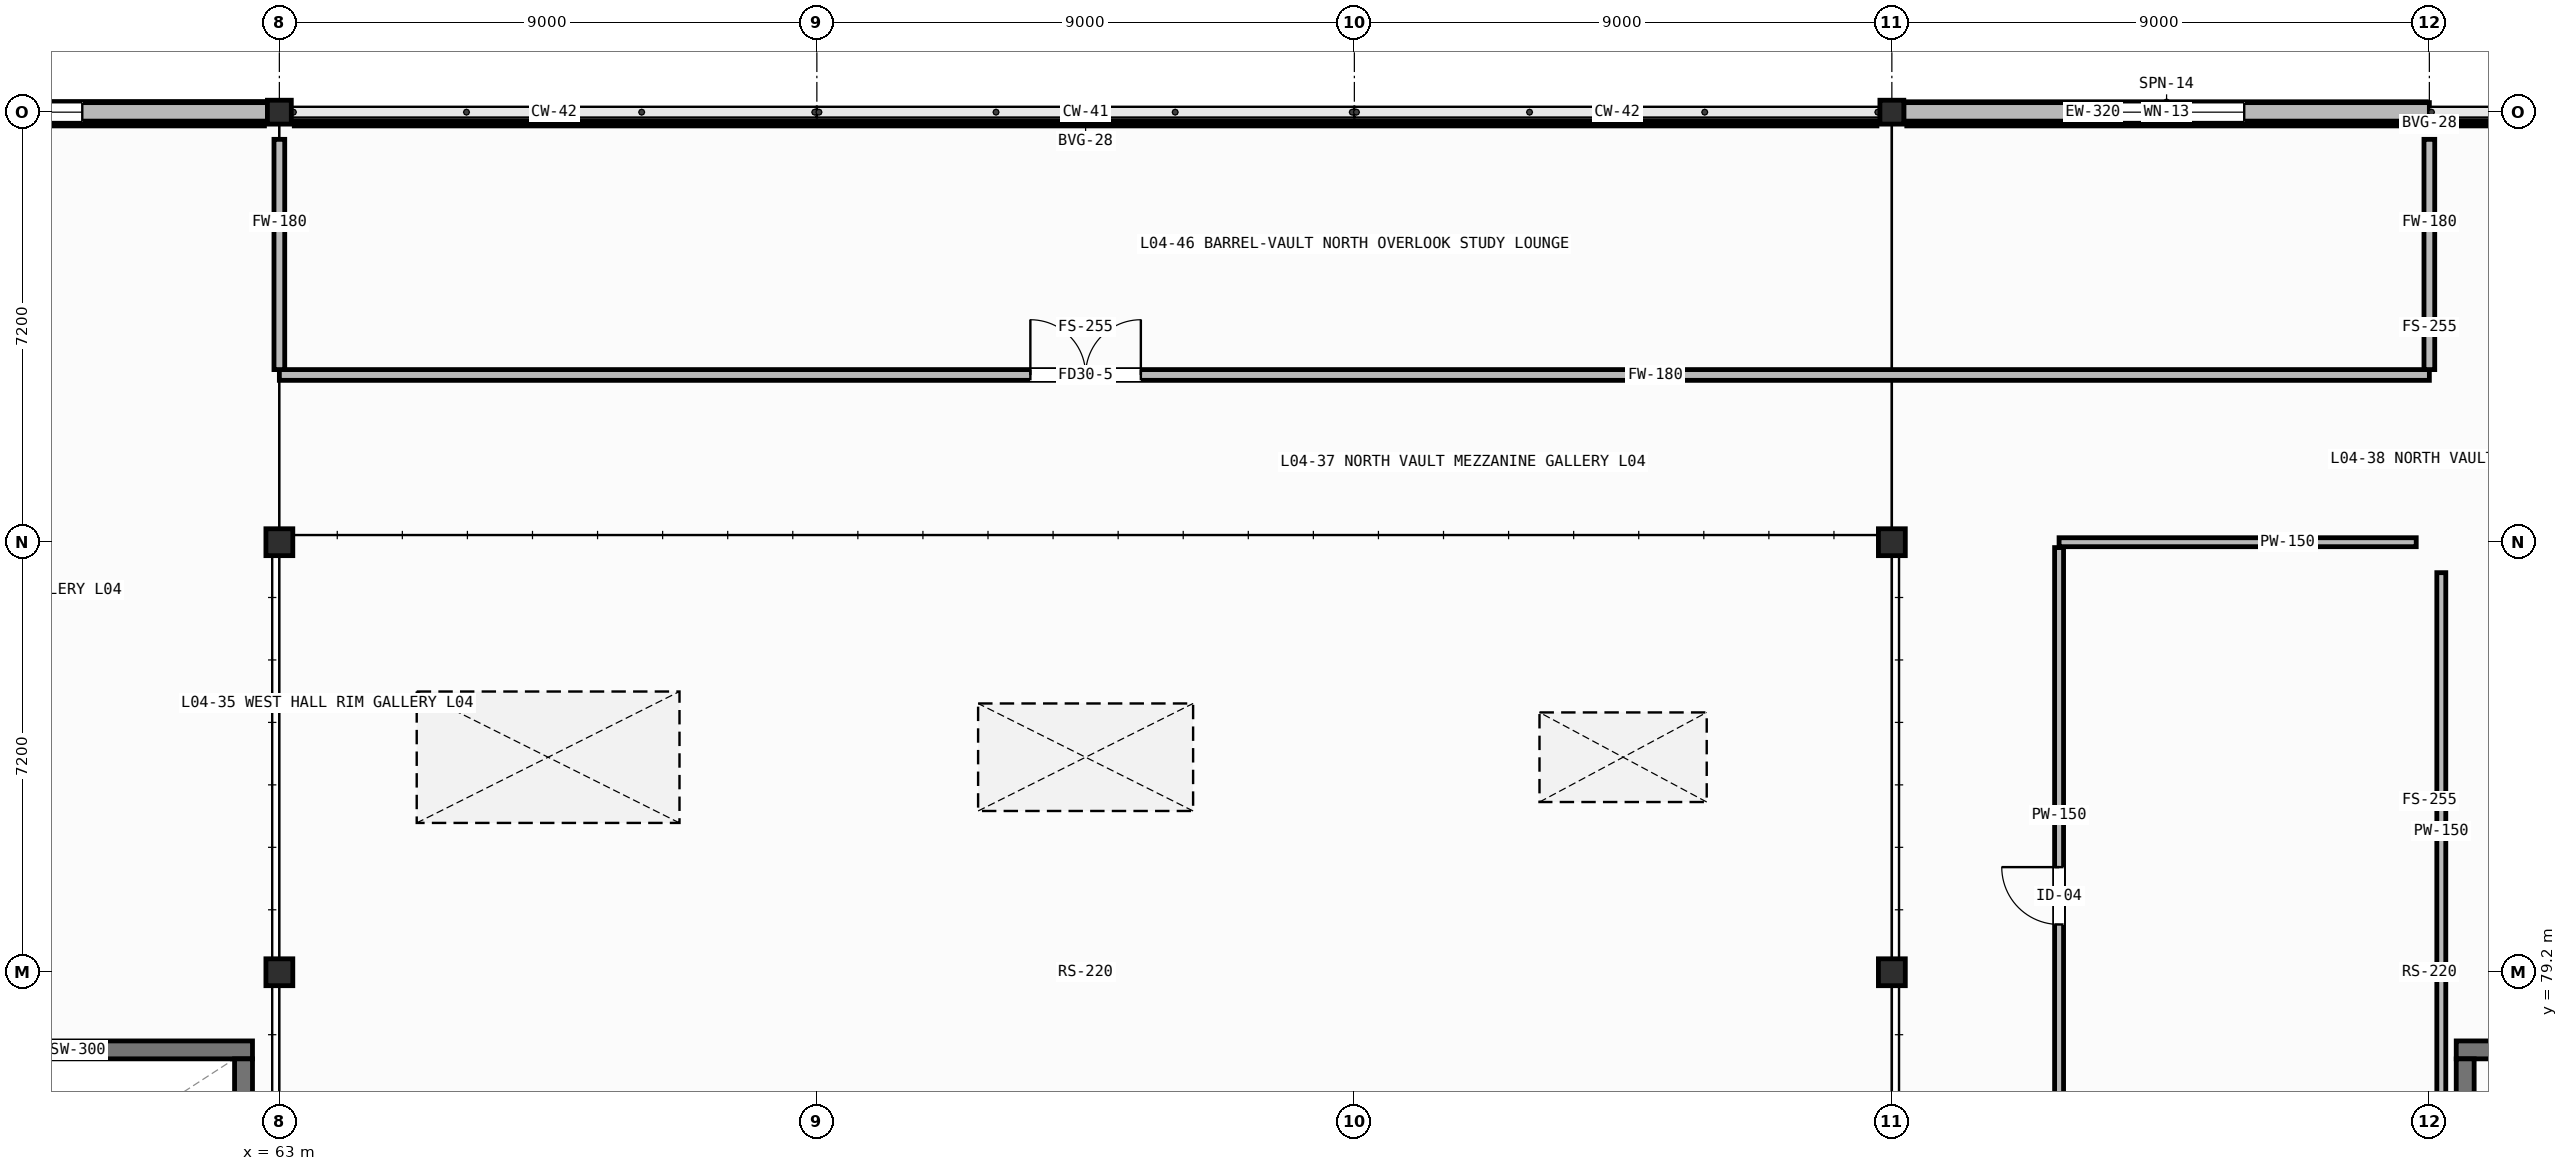
"""IFC4 building model, lengths in metres.
Left out: names, types, materials, properties, quantities, classifications, styles, units other than length and angle.
Written with IfcOpenShell. Run it as: python <this file> out.ifc"""

import sys

from ifc_helpers import new_model, si_unit, direction, frame, frame_2d, origin, origin_2d, place, context, subcontext, project, spatial, rectangle, hollow_rectangle, extrude, element, fill, save


model = new_model("IFC4")
c1 = context("Model", 3, precision=1e-05, world=origin(), true_north=direction((0.0, 1.0)))
c2 = subcontext(c1, "Body", "Model", "MODEL_VIEW")
j1 = project(units=[si_unit("LENGTHUNIT", "METRE"), si_unit("PLANEANGLEUNIT", "RADIAN")], contexts=[c1])
p1 = place(None, origin())
s1 = spatial("IfcSite", under=j1, at=p1, CompositionType="ELEMENT")
p2 = place(p1, origin())
s2 = spatial("IfcBuilding", under=s1, at=p2, CompositionType="ELEMENT")
p3 = place(p2, frame((0.0, 0.0, 12.8)))
s3 = spatial("IfcBuildingStorey", under=s2, at=p3, CompositionType="ELEMENT", Elevation=12.8)
for number, where, z_axis, x_axis in (
    (1, (63.0, 79.2, 0.0), (0.0, 0.0, 1.0), (1.0, 0.0, 0.0)),
    (2, (63.0, 86.4, 0.0), (0.0, 0.0, 1.0), (1.0, 0.0, 0.0)),
):
    element("IfcColumn", number, at=place(p3, frame(where, z_axis=z_axis, x_axis=x_axis)), inside=s3, PredefinedType="COLUMN", context=c2, shape_type="SweptSolid", body=[
        extrude(hollow_rectangle(XDim=0.45, YDim=0.45, WallThickness=0.019, at=origin_2d()), origin(), (0.0, 0.0, 1.0), 3.78),
    ])
p4 = place(p3, frame((63.0, 93.6, 0.0), z_axis=(0.0, 0.0, 1.0), x_axis=(1.0, 0.0, 0.0)))
e3 = element("IfcColumn", 3, at=p4, inside=s3, PredefinedType="COLUMN", context=c2, shape_type="SweptSolid", body=[
    extrude(hollow_rectangle(XDim=0.4, YDim=0.4, WallThickness=0.016, at=origin_2d()), origin(), (0.0, 0.0, 1.0), 3.78),
])
for number, where, z_axis, x_axis in (
    (4, (90.0, 79.2, 0.0), (0.0, 0.0, 1.0), (1.0, 0.0, 0.0)),
    (5, (90.0, 86.4, 0.0), (0.0, 0.0, 1.0), (1.0, 0.0, 0.0)),
):
    element("IfcColumn", number, at=place(p3, frame(where, z_axis=z_axis, x_axis=x_axis)), inside=s3, PredefinedType="COLUMN", context=c2, shape_type="SweptSolid", body=[
        extrude(hollow_rectangle(XDim=0.45, YDim=0.45, WallThickness=0.019, at=origin_2d()), origin(), (0.0, 0.0, 1.0), 3.78),
    ])
p5 = place(p3, frame((90.0, 93.6, 0.0), z_axis=(0.0, 0.0, 1.0), x_axis=(1.0, 0.0, 0.0)))
e6 = element("IfcColumn", 6, at=p5, inside=s3, PredefinedType="COLUMN", context=c2, shape_type="SweptSolid", body=[
    extrude(hollow_rectangle(XDim=0.4, YDim=0.4, WallThickness=0.016, at=origin_2d()), origin(), (0.0, 0.0, 1.0), 3.78),
])
p6 = place(p3, frame((62.8, 93.6, 0.0), z_axis=(0.0, 0.0, 1.0), x_axis=(-1.0, 0.0, 0.0)))
e7 = element("IfcWall", 7, at=p6, inside=s3, PredefinedType="STANDARD", context=c2, shape_type="SweptSolid", body=[
    extrude(rectangle(XDim=8.8, YDim=0.32, at=frame_2d((4.4, 0.0))), origin(), (0.0, 0.0, 1.0), 3.08),
])
p7 = place(p6, frame((3.1, 0.0, 0.85)))
e8 = element("IfcOpeningElement", 8, at=p7, cuts=e7, PredefinedType="OPENING", context=c2, shape_type="SweptSolid", body=[
    extrude(rectangle(XDim=2.6, YDim=1.6, at=frame_2d((1.3, 0.8))), frame((0.0, 0.172, 0.0), z_axis=(0.0, -1.0, 0.0), x_axis=(1.0, 0.0, 0.0)), (0.0, 0.0, 1.0), 0.344),
])
p8 = place(p3, frame((99.0, 93.6, 0.0), z_axis=(0.0, 0.0, 1.0), x_axis=(-1.0, 0.0, 0.0)))
e9 = element("IfcWall", 9, at=p8, inside=s3, PredefinedType="STANDARD", context=c2, shape_type="SweptSolid", body=[
    extrude(rectangle(XDim=8.8, YDim=0.32, at=frame_2d((4.4, 0.0))), origin(), (0.0, 0.0, 1.0), 3.08),
])
p9 = place(p8, frame((3.1, 0.0, 0.85)))
e10 = element("IfcOpeningElement", 10, at=p9, cuts=e9, PredefinedType="OPENING", context=c2, shape_type="SweptSolid", body=[
    extrude(rectangle(XDim=2.6, YDim=1.6, at=frame_2d((1.3, 0.8))), frame((0.0, 0.172, 0.0), z_axis=(0.0, -1.0, 0.0), x_axis=(1.0, 0.0, 0.0)), (0.0, 0.0, 1.0), 0.344),
])
p10 = place(p3, frame((54.45, 77.9, 0.0), z_axis=(0.0, 0.0, 1.0), x_axis=(1.0, 0.0, 0.0)))
e11 = element("IfcWall", 11, at=p10, inside=s3, PredefinedType="SHEAR", context=c2, shape_type="SweptSolid", body=[
    extrude(rectangle(XDim=8.1, YDim=0.3, at=frame_2d((4.05, 0.0))), origin(), (0.0, 0.0, 1.0), 3.78),
])
p11 = place(p3, frame((62.4, 73.95, 0.0), z_axis=(0.0, 0.0, 1.0), x_axis=(0.0, 1.0, 0.0)))
e12 = element("IfcWall", 12, at=p11, inside=s3, PredefinedType="SHEAR", context=c2, shape_type="SweptSolid", body=[
    extrude(rectangle(XDim=3.8, YDim=0.3, at=frame_2d((1.9, 0.0))), origin(), (0.0, 0.0, 1.0), 3.78),
])
p12 = place(p3, frame((99.45, 77.9, 0.0), z_axis=(0.0, 0.0, 1.0), x_axis=(1.0, 0.0, 0.0)))
e13 = element("IfcWall", 13, at=p12, inside=s3, PredefinedType="SHEAR", context=c2, shape_type="SweptSolid", body=[
    extrude(rectangle(XDim=8.1, YDim=0.3, at=frame_2d((4.05, 0.0))), origin(), (0.0, 0.0, 1.0), 3.78),
])
p13 = place(p3, frame((99.6, 73.95, 0.0), z_axis=(0.0, 0.0, 1.0), x_axis=(0.0, 1.0, 0.0)))
e14 = element("IfcWall", 14, at=p13, inside=s3, PredefinedType="SHEAR", context=c2, shape_type="SweptSolid", body=[
    extrude(rectangle(XDim=3.8, YDim=0.3, at=frame_2d((1.9, 0.0))), origin(), (0.0, 0.0, 1.0), 3.78),
])
p14 = place(p3, frame((92.8, 86.4, 0.0), z_axis=(0.0, 0.0, 1.0), x_axis=(1.0, 0.0, 0.0)))
e15 = element("IfcWall", 15, at=p14, inside=s3, PredefinedType="PARTITIONING", context=c2, shape_type="SweptSolid", body=[
    extrude(rectangle(XDim=5.98, YDim=0.15, at=frame_2d((2.99, 0.0))), origin(), (0.0, 0.0, 1.0), 3.06),
])
p15 = place(p3, frame((92.8, 73.89, 0.0), z_axis=(0.0, 0.0, 1.0), x_axis=(0.0, 1.0, 0.0)))
e16 = element("IfcWall", 16, at=p15, inside=s3, PredefinedType="PARTITIONING", context=c2, shape_type="SweptSolid", body=[
    extrude(rectangle(XDim=12.42, YDim=0.15, at=frame_2d((6.21, 0.0))), origin(), (0.0, 0.0, 1.0), 3.78),
])
p16 = place(p15, frame((6.11, 0.0, 0.0)))
e17 = element("IfcOpeningElement", 17, at=p16, cuts=e16, PredefinedType="OPENING", context=c2, shape_type="SweptSolid", body=[
    extrude(rectangle(XDim=0.96, YDim=2.1, at=frame_2d((0.48, 1.05))), frame((0.0, 0.087, 0.0), z_axis=(0.0, -1.0, 0.0), x_axis=(1.0, 0.0, 0.0)), (0.0, 0.0, 1.0), 0.174),
])
p17 = place(p3, frame((99.2, 73.89, 0.0), z_axis=(0.0, 0.0, 1.0), x_axis=(0.0, 1.0, 0.0)))
e18 = element("IfcWall", 18, at=p17, inside=s3, PredefinedType="PARTITIONING", context=c2, shape_type="SweptSolid", body=[
    extrude(rectangle(XDim=12.0, YDim=0.15, at=frame_2d((6.0, 0.0))), origin(), (0.0, 0.0, 1.0), 3.06),
])
p18 = place(p3, frame((63.0, 89.2, 0.0), z_axis=(0.0, 0.0, 1.0), x_axis=(1.0, 0.0, 0.0)))
e19 = element("IfcWall", 19, at=p18, inside=s3, PredefinedType="PARTITIONING", context=c2, shape_type="SweptSolid", body=[
    extrude(rectangle(XDim=36.0, YDim=0.18, at=frame_2d((18.0, 0.0))), origin(), (0.0, 0.0, 1.0), 3.78),
])
p19 = place(p18, frame((12.575, 0.0, 0.0)))
e20 = element("IfcOpeningElement", 20, at=p19, cuts=e19, PredefinedType="OPENING", context=c2, shape_type="SweptSolid", body=[
    extrude(rectangle(XDim=1.85, YDim=2.12, at=frame_2d((0.925, 1.06))), frame((0.0, 0.102, 0.0), z_axis=(0.0, -1.0, 0.0), x_axis=(1.0, 0.0, 0.0)), (0.0, 0.0, 1.0), 0.204),
])
for number, where, z_axis, x_axis in (
    (21, (63.0, 89.29, 0.0), (0.0, 0.0, 1.0), (0.0, 1.0, 0.0)),
    (22, (99.0, 89.29, 0.0), (0.0, 0.0, 1.0), (0.0, 1.0, 0.0)),
):
    element("IfcWall", number, at=place(p3, frame(where, z_axis=z_axis, x_axis=x_axis)), inside=s3, PredefinedType="PARTITIONING", context=c2, shape_type="SweptSolid", body=[
        extrude(rectangle(XDim=3.855, YDim=0.18, at=frame_2d((1.927, 0.0))), origin(), (0.0, 0.0, 1.0), 3.06),
    ])
p20 = place(p7, origin())
e23 = element("IfcWindow", 23, at=p20, inside=s3, PartitioningType="DOUBLE_PANEL_VERTICAL", PredefinedType="WINDOW", context=c2, shape_type="SweptSolid", body=[
    extrude(rectangle(XDim=2.6, YDim=1.6, at=frame_2d((1.3, 0.8))), frame((0.0, 0.03, 0.0), z_axis=(0.0, -1.0, 0.0), x_axis=(1.0, 0.0, 0.0)), (0.0, 0.0, 1.0), 0.06),
])
fill(e8, e23)
p21 = place(p9, origin())
e24 = element("IfcWindow", 24, at=p21, inside=s3, PartitioningType="DOUBLE_PANEL_VERTICAL", PredefinedType="WINDOW", context=c2, shape_type="SweptSolid", body=[
    extrude(rectangle(XDim=2.6, YDim=1.6, at=frame_2d((1.3, 0.8))), frame((0.0, 0.03, 0.0), z_axis=(0.0, -1.0, 0.0), x_axis=(1.0, 0.0, 0.0)), (0.0, 0.0, 1.0), 0.06),
])
fill(e10, e24)
p22 = place(p3, frame((0.0, 0.0, 3.78)))
p23 = place(p22, frame((67.5, 82.8, 0.16)))
e25 = element("IfcWindow", 25, at=p23, inside=s3, PartitioningType="SINGLE_PANEL", PredefinedType="SKYLIGHT", context=c2, shape_type="SweptSolid", body=[
    extrude(rectangle(XDim=4.4, YDim=2.2, at=origin_2d()), origin(), (0.0, 0.0, 1.0), 0.06),
])
p24 = place(p22, frame((76.5, 82.8, 0.16)))
e26 = element("IfcWindow", 26, at=p24, inside=s3, PartitioningType="SINGLE_PANEL", PredefinedType="SKYLIGHT", context=c2, shape_type="SweptSolid", body=[
    extrude(rectangle(XDim=3.6, YDim=1.8, at=origin_2d()), origin(), (0.0, 0.0, 1.0), 0.06),
])
p25 = place(p22, frame((85.5, 82.8, 0.16)))
e27 = element("IfcWindow", 27, at=p25, inside=s3, PartitioningType="SINGLE_PANEL", PredefinedType="SKYLIGHT", context=c2, shape_type="SweptSolid", body=[
    extrude(rectangle(XDim=2.8, YDim=1.5, at=origin_2d()), origin(), (0.0, 0.0, 1.0), 0.06),
])
p26 = place(p16, origin())
e28 = element("IfcDoor", 28, at=p26, inside=s3, OperationType="SINGLE_SWING_RIGHT", PredefinedType="DOOR", context=c2, shape_type="SweptSolid", body=[
    extrude(rectangle(XDim=0.96, YDim=2.1, at=frame_2d((0.48, 1.05))), frame((0.0, 0.025, 0.0), z_axis=(0.0, -1.0, 0.0), x_axis=(1.0, 0.0, 0.0)), (0.0, 0.0, 1.0), 0.05),
])
fill(e17, e28)
p27 = place(p19, origin())
e29 = element("IfcDoor", 29, at=p27, inside=s3, OperationType="DOUBLE_DOOR_SINGLE_SWING", PredefinedType="DOOR", context=c2, shape_type="SweptSolid", body=[
    extrude(rectangle(XDim=1.85, YDim=2.12, at=frame_2d((0.925, 1.06))), frame((0.0, 0.025, 0.0), z_axis=(0.0, -1.0, 0.0), x_axis=(1.0, 0.0, 0.0)), (0.0, 0.0, 1.0), 0.05),
])
fill(e20, e29)
save(model, sys.argv[1])
